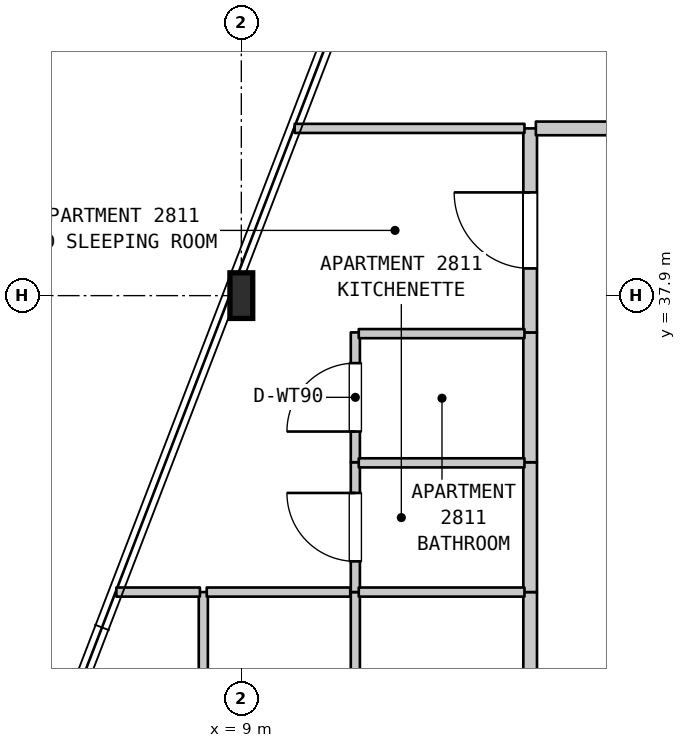
"""IFC4 building model, lengths in metres.
Left out: names, types, materials, properties, quantities, classifications, styles, units other than length and angle.
Written with IfcOpenShell. Run it as: python <this file> out.ifc"""

import sys

from ifc_helpers import new_model, si_unit, direction, frame, frame_2d, origin, origin_2d, place, context, subcontext, project, spatial, rectangle, i_section, extrude, element, fill, save


model = new_model("IFC4")
c1 = context("Model", 3, precision=1e-05, world=origin(), true_north=direction((0.0, 1.0)))
c2 = subcontext(c1, "Body", "Model", "MODEL_VIEW")
j1 = project(units=[si_unit("LENGTHUNIT", "METRE"), si_unit("PLANEANGLEUNIT", "RADIAN")], contexts=[c1])
p1 = place(None, origin())
s1 = spatial("IfcSite", under=j1, at=p1, CompositionType="ELEMENT")
p2 = place(p1, origin())
s2 = spatial("IfcBuilding", under=s1, at=p2, CompositionType="ELEMENT")
p3 = place(p2, frame((0.0, 0.0, 116.8)))
s3 = spatial("IfcBuildingStorey", under=s2, at=p3, CompositionType="ELEMENT", Elevation=116.8)
p4 = place(p3, frame((9.0, 37.9, 0.0), z_axis=(0.0, 0.0, 1.0), x_axis=(1.0, 0.0, 0.0)))
e1 = element("IfcColumn", 1, at=p4, inside=s3, PredefinedType="COLUMN", context=c2, shape_type="SweptSolid", body=[
    extrude(i_section(OverallWidth=0.3, OverallDepth=0.6, WebThickness=0.015, FlangeThickness=0.03, FilletRadius=0.027, at=origin_2d()), origin(), (0.0, 0.0, 1.0), 3.7),
])
for number, where, z_axis, x_axis in (
    (2, (8.5, 30.54, 0.0), (0.0, 0.0, 1.0), (0.0, 1.0, 0.0)),
    (3, (10.5, 30.54, 0.0), (0.0, 0.0, 1.0), (0.0, 1.0, 0.0)),
):
    element("IfcWall", number, at=place(p3, frame(where, z_axis=z_axis, x_axis=x_axis)), inside=s3, PredefinedType="PARTITIONING", context=c2, shape_type="SweptSolid", body=[
        extrude(rectangle(XDim=3.46, YDim=0.12, at=frame_2d((1.73, 0.0))), origin(), (0.0, 0.0, 1.0), 3.38),
    ])
p5 = place(p3, frame((10.5, 34.0, 0.0), z_axis=(0.0, 0.0, 1.0), x_axis=(0.0, 1.0, 0.0)))
e4 = element("IfcWall", 4, at=p5, inside=s3, PredefinedType="PARTITIONING", context=c2, shape_type="SweptSolid", body=[
    extrude(rectangle(XDim=1.708, YDim=0.12, at=frame_2d((0.854, 0.0))), origin(), (0.0, 0.0, 1.0), 3.38),
])
p6 = place(p5, frame((0.404, 0.0, 0.0)))
e5 = element("IfcOpeningElement", 5, at=p6, cuts=e4, PredefinedType="OPENING", context=c2, shape_type="SweptSolid", body=[
    extrude(rectangle(XDim=0.9, YDim=2.15, at=frame_2d((0.45, 1.075))), frame((0.0, 0.07, 0.0), z_axis=(0.0, -1.0, 0.0), x_axis=(1.0, 0.0, 0.0)), (0.0, 0.0, 1.0), 0.14),
])
p7 = place(p3, frame((10.5, 35.708, 0.0), z_axis=(0.0, 0.0, 1.0), x_axis=(0.0, 1.0, 0.0)))
e6 = element("IfcWall", 6, at=p7, inside=s3, PredefinedType="PARTITIONING", context=c2, shape_type="SweptSolid", body=[
    extrude(rectangle(XDim=1.708, YDim=0.12, at=frame_2d((0.854, 0.0))), origin(), (0.0, 0.0, 1.0), 3.38),
])
p8 = place(p7, frame((0.404, 0.0, 0.0)))
e7 = element("IfcOpeningElement", 7, at=p8, cuts=e6, PredefinedType="OPENING", context=c2, shape_type="SweptSolid", body=[
    extrude(rectangle(XDim=0.9, YDim=2.1, at=frame_2d((0.45, 1.05))), frame((0.0, 0.07, 0.0), z_axis=(0.0, -1.0, 0.0), x_axis=(1.0, 0.0, 0.0)), (0.0, 0.0, 1.0), 0.14),
])
p9 = place(p3, frame((12.8, 30.54, 0.0), z_axis=(0.0, 0.0, 1.0), x_axis=(0.0, 1.0, 0.0)))
e8 = element("IfcWall", 8, at=p9, inside=s3, PredefinedType="STANDARD", context=c2, shape_type="SweptSolid", body=[
    extrude(rectangle(XDim=3.46, YDim=0.18, at=frame_2d((1.73, 0.0))), origin(), (0.0, 0.0, 1.0), 3.38),
])
for number, where, z_axis, x_axis in (
    (9, (12.8, 34.0, 0.0), (0.0, 0.0, 1.0), (0.0, 1.0, 0.0)),
    (10, (12.8, 35.708, 0.0), (0.0, 0.0, 1.0), (0.0, 1.0, 0.0)),
):
    element("IfcWall", number, at=place(p3, frame(where, z_axis=z_axis, x_axis=x_axis)), inside=s3, PredefinedType="STANDARD", context=c2, shape_type="SweptSolid", body=[
        extrude(rectangle(XDim=1.708, YDim=0.18, at=frame_2d((0.854, 0.0))), origin(), (0.0, 0.0, 1.0), 3.38),
    ])
p10 = place(p3, frame((12.8, 37.416, 0.0), z_axis=(0.0, 0.0, 1.0), x_axis=(0.0, 1.0, 0.0)))
e11 = element("IfcWall", 11, at=p10, inside=s3, PredefinedType="STANDARD", context=c2, shape_type="SweptSolid", body=[
    extrude(rectangle(XDim=2.684, YDim=0.18, at=frame_2d((1.342, 0.0))), origin(), (0.0, 0.0, 1.0), 3.38),
])
p11 = place(p10, frame((0.842, 0.0, 0.0)))
e12 = element("IfcOpeningElement", 12, at=p11, cuts=e11, PredefinedType="OPENING", context=c2, shape_type="SweptSolid", body=[
    extrude(rectangle(XDim=1.0, YDim=2.15, at=frame_2d((0.5, 1.075))), frame((0.0, 0.1, 0.0), z_axis=(0.0, -1.0, 0.0), x_axis=(1.0, 0.0, 0.0)), (0.0, 0.0, 1.0), 0.2),
])
p12 = place(p3, frame((7.356, 34.0, 0.0), z_axis=(0.0, 0.0, 1.0), x_axis=(1.0, 0.0, 0.0)))
e13 = element("IfcWall", 13, at=p12, inside=s3, PredefinedType="PARTITIONING", context=c2, shape_type="SweptSolid", body=[
    extrude(rectangle(XDim=1.099, YDim=0.12, at=frame_2d((0.55, 0.0))), origin(), (0.0, 0.0, 1.0), 3.38),
])
p13 = place(p3, frame((8.545, 34.0, 0.0), z_axis=(0.0, 0.0, 1.0), x_axis=(1.0, 0.0, 0.0)))
e14 = element("IfcWall", 14, at=p13, inside=s3, PredefinedType="PARTITIONING", context=c2, shape_type="SweptSolid", body=[
    extrude(rectangle(XDim=1.888, YDim=0.12, at=frame_2d((0.944, 0.0))), origin(), (0.0, 0.0, 1.0), 3.38),
])
for number, where, z_axis, x_axis in (
    (15, (10.545, 34.0, 0.0), (0.0, 0.0, 1.0), (1.0, 0.0, 0.0)),
    (16, (10.545, 35.7, 0.0), (0.0, 0.0, 1.0), (1.0, 0.0, 0.0)),
    (17, (10.545, 37.4, 0.0), (0.0, 0.0, 1.0), (1.0, 0.0, 0.0)),
):
    element("IfcWall", number, at=place(p3, frame(where, z_axis=z_axis, x_axis=x_axis)), inside=s3, PredefinedType="PARTITIONING", context=c2, shape_type="SweptSolid", body=[
        extrude(rectangle(XDim=2.18, YDim=0.12, at=frame_2d((1.09, 0.0))), origin(), (0.0, 0.0, 1.0), 3.38),
    ])
p14 = place(p3, frame((9.702, 40.1, 0.0), z_axis=(0.0, 0.0, 1.0), x_axis=(1.0, 0.0, 0.0)))
e18 = element("IfcWall", 18, at=p14, inside=s3, PredefinedType="PARTITIONING", context=c2, shape_type="SweptSolid", body=[
    extrude(rectangle(XDim=3.023, YDim=0.12, at=frame_2d((1.512, 0.0))), origin(), (0.0, 0.0, 1.0), 3.38),
])
p15 = place(p3, frame((12.875, 40.1, 0.0), z_axis=(0.0, 0.0, 1.0), x_axis=(1.0, 0.0, 0.0)))
e19 = element("IfcWall", 19, at=p15, inside=s3, PredefinedType="STANDARD", context=c2, shape_type="SweptSolid", body=[
    extrude(rectangle(XDim=1.48, YDim=0.18, at=frame_2d((0.74, 0.0))), origin(), (0.0, 0.0, 1.0), 3.38),
])
p16 = place(p6, origin())
e20 = element("IfcDoor", 20, at=p16, inside=s3, OperationType="SINGLE_SWING_RIGHT", PredefinedType="DOOR", context=c2, shape_type="SweptSolid", body=[
    extrude(rectangle(XDim=0.9, YDim=2.15, at=frame_2d((0.45, 1.075))), frame((0.0, 0.025, 0.0), z_axis=(0.0, -1.0, 0.0), x_axis=(1.0, 0.0, 0.0)), (0.0, 0.0, 1.0), 0.05),
])
fill(e5, e20)
p17 = place(p8, origin())
e21 = element("IfcDoor", 21, at=p17, inside=s3, OperationType="SINGLE_SWING_LEFT", PredefinedType="DOOR", context=c2, shape_type="SweptSolid", body=[
    extrude(rectangle(XDim=0.9, YDim=2.1, at=frame_2d((0.45, 1.05))), frame((0.0, 0.025, 0.0), z_axis=(0.0, -1.0, 0.0), x_axis=(1.0, 0.0, 0.0)), (0.0, 0.0, 1.0), 0.05),
])
fill(e7, e21)
p18 = place(p11, origin())
e22 = element("IfcDoor", 22, at=p18, inside=s3, OperationType="SINGLE_SWING_RIGHT", PredefinedType="DOOR", context=c2, shape_type="SweptSolid", body=[
    extrude(rectangle(XDim=1.0, YDim=2.15, at=frame_2d((0.5, 1.075))), frame((0.0, 0.025, 0.0), z_axis=(0.0, -1.0, 0.0), x_axis=(1.0, 0.0, 0.0)), (0.0, 0.0, 1.0), 0.05),
])
fill(e12, e22)
save(model, sys.argv[1])
